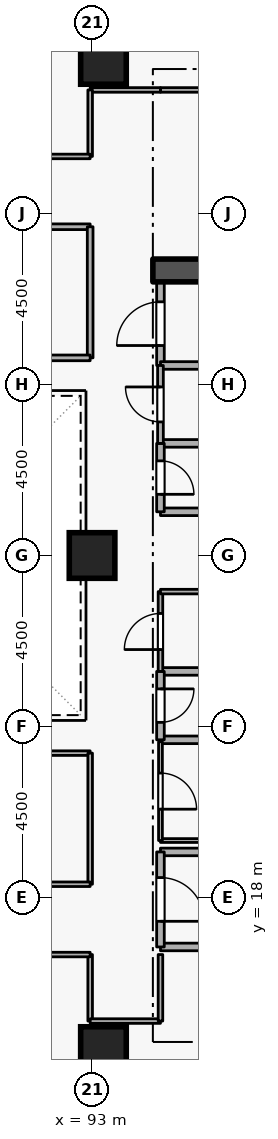
"""IFC4 building model, lengths in metres.
Left out: names, types, materials, properties, quantities, classifications, styles, units other than length and angle.
Written with IfcOpenShell. Run it as: python <this file> out.ifc"""

import sys

from ifc_helpers import new_model, si_unit, direction, frame, frame_2d, origin, origin_2d, place, context, subcontext, project, spatial, rectangle, extrude, element, fill, save


model = new_model("IFC4")
c1 = context("Model", 3, precision=1e-05, world=origin(), true_north=direction((0.0, 1.0)))
c2 = subcontext(c1, "Body", "Model", "MODEL_VIEW")
j1 = project(units=[si_unit("LENGTHUNIT", "METRE"), si_unit("PLANEANGLEUNIT", "RADIAN")], contexts=[c1])
p1 = place(None, origin())
s1 = spatial("IfcSite", under=j1, at=p1, CompositionType="ELEMENT")
p2 = place(p1, origin())
s2 = spatial("IfcBuilding", under=s1, at=p2, CompositionType="ELEMENT")
p3 = place(p2, frame((0.0, 0.0, 116.1)))
s3 = spatial("IfcBuildingStorey", under=s2, at=p3, CompositionType="ELEMENT", Elevation=116.1)
p4 = place(p3, frame((94.6, 34.5, 0.0), z_axis=(0.0, 0.0, 1.0), x_axis=(1.0, 0.0, 0.0)))
e1 = element("IfcWall", 1, at=p4, inside=s3, PredefinedType="SHEAR", context=c2, shape_type="SweptSolid", body=[
    extrude(rectangle(XDim=5.7, YDim=0.6, at=frame_2d((2.85, 0.0))), origin(), (0.0, 0.0, 1.0), 3.6),
])
for number, where, z_axis, x_axis in (
    (2, (93.3, 14.0, 0.0), (0.0, 0.0, 1.0), (1.0, 0.0, 0.0)),
    (3, (93.3, 40.0, 0.0), (0.0, 0.0, 1.0), (1.0, 0.0, 0.0)),
    (4, (93.0, 27.0, 0.0), (0.0, 0.0, 1.0), (1.0, 0.0, 0.0)),
):
    element("IfcColumn", number, at=place(p3, frame(where, z_axis=z_axis, x_axis=x_axis)), inside=s3, PredefinedType="COLUMN", context=c2, shape_type="SweptSolid", body=[
        extrude(rectangle(XDim=1.2, YDim=1.2, at=origin_2d()), origin(), (0.0, 0.0, 1.0), 3.6),
    ])
p5 = place(p3, frame((94.8, 16.7, 0.0), z_axis=(0.0, 0.0, 1.0), x_axis=(1.0, 0.0, 0.0)))
e5 = element("IfcWall", 5, at=p5, inside=s3, PredefinedType="STANDARD", context=c2, shape_type="SweptSolid", body=[
    extrude(rectangle(XDim=5.7, YDim=0.2, at=frame_2d((2.85, 0.0))), origin(), (0.0, 0.0, 1.0), 3.32),
])
p6 = place(p3, frame((97.1, 19.2, 0.0), z_axis=(0.0, 0.0, 1.0), x_axis=(-1.0, 0.0, 0.0)))
e6 = element("IfcWall", 6, at=p6, inside=s3, PredefinedType="STANDARD", context=c2, shape_type="SweptSolid", body=[
    extrude(rectangle(XDim=2.3, YDim=0.2, at=frame_2d((1.15, 0.0))), origin(), (0.0, 0.0, 1.0), 2.525),
])
p7 = place(p3, frame((94.8, 19.2, 0.0), z_axis=(0.0, 0.0, 1.0), x_axis=(0.0, -1.0, 0.0)))
e7 = element("IfcWall", 7, at=p7, inside=s3, PredefinedType="STANDARD", context=c2, shape_type="SweptSolid", body=[
    extrude(rectangle(XDim=2.5, YDim=0.2, at=frame_2d((1.25, 0.0))), origin(), (0.0, 0.0, 1.0), 3.32),
])
p8 = place(p7, frame((0.675, 0.0, 0.0)))
e8 = element("IfcOpeningElement", 8, at=p8, cuts=e7, PredefinedType="OPENING", context=c2, shape_type="SweptSolid", body=[
    extrude(rectangle(XDim=1.15, YDim=2.1, at=frame_2d((0.575, 1.05))), frame((0.0, 0.11, 0.0), z_axis=(0.0, -1.0, 0.0), x_axis=(1.0, 0.0, 0.0)), (0.0, 0.0, 1.0), 0.22),
])
for number, where, z_axis, x_axis in (
    (9, (94.8, 28.15, 0.0), (0.0, 0.0, 1.0), (1.0, 0.0, 0.0)),
    (10, (96.85, 29.95, 0.0), (0.0, 0.0, 1.0), (-1.0, 0.0, 0.0)),
):
    element("IfcWall", number, at=place(p3, frame(where, z_axis=z_axis, x_axis=x_axis)), inside=s3, PredefinedType="STANDARD", context=c2, shape_type="SweptSolid", body=[
        extrude(rectangle(XDim=2.05, YDim=0.2, at=frame_2d((1.025, 0.0))), origin(), (0.0, 0.0, 1.0), 3.32),
    ])
p9 = place(p3, frame((94.8, 29.95, 0.0), z_axis=(0.0, 0.0, 1.0), x_axis=(0.0, -1.0, 0.0)))
e11 = element("IfcWall", 11, at=p9, inside=s3, PredefinedType="STANDARD", context=c2, shape_type="SweptSolid", body=[
    extrude(rectangle(XDim=1.8, YDim=0.2, at=frame_2d((0.9, 0.0))), origin(), (0.0, 0.0, 1.0), 3.32),
])
p10 = place(p9, frame((0.46, 0.0, 0.0)))
e12 = element("IfcOpeningElement", 12, at=p10, cuts=e11, PredefinedType="OPENING", context=c2, shape_type="SweptSolid", body=[
    extrude(rectangle(XDim=0.88, YDim=2.04, at=frame_2d((0.44, 1.02))), frame((0.0, 0.11, 0.0), z_axis=(0.0, -1.0, 0.0), x_axis=(1.0, 0.0, 0.0)), (0.0, 0.0, 1.0), 0.22),
])
for number, where, z_axis, x_axis in (
    (13, (94.8, 22.15, 0.0), (0.0, 0.0, 1.0), (1.0, 0.0, 0.0)),
    (14, (96.85, 23.95, 0.0), (0.0, 0.0, 1.0), (-1.0, 0.0, 0.0)),
):
    element("IfcWall", number, at=place(p3, frame(where, z_axis=z_axis, x_axis=x_axis)), inside=s3, PredefinedType="STANDARD", context=c2, shape_type="SweptSolid", body=[
        extrude(rectangle(XDim=2.05, YDim=0.2, at=frame_2d((1.025, 0.0))), origin(), (0.0, 0.0, 1.0), 3.32),
    ])
p11 = place(p3, frame((94.8, 23.95, 0.0), z_axis=(0.0, 0.0, 1.0), x_axis=(0.0, -1.0, 0.0)))
e15 = element("IfcWall", 15, at=p11, inside=s3, PredefinedType="STANDARD", context=c2, shape_type="SweptSolid", body=[
    extrude(rectangle(XDim=1.8, YDim=0.2, at=frame_2d((0.9, 0.0))), origin(), (0.0, 0.0, 1.0), 3.32),
])
p12 = place(p11, frame((0.46, 0.0, 0.0)))
e16 = element("IfcOpeningElement", 16, at=p12, cuts=e15, PredefinedType="OPENING", context=c2, shape_type="SweptSolid", body=[
    extrude(rectangle(XDim=0.88, YDim=2.04, at=frame_2d((0.44, 1.02))), frame((0.0, 0.11, 0.0), z_axis=(0.0, -1.0, 0.0), x_axis=(1.0, 0.0, 0.0)), (0.0, 0.0, 1.0), 0.22),
])
p13 = place(p3, frame((94.8, 32.0, 0.0), z_axis=(0.0, 0.0, 1.0), x_axis=(0.0, 1.0, 0.0)))
e17 = element("IfcWall", 17, at=p13, inside=s3, PredefinedType="STANDARD", context=c2, shape_type="SweptSolid", body=[
    extrude(rectangle(XDim=2.2, YDim=0.2, at=frame_2d((1.1, 0.0))), origin(), (0.0, 0.0, 1.0), 3.32),
])
p14 = place(p13, frame((0.525, 0.0, 0.0)))
e18 = element("IfcOpeningElement", 18, at=p14, cuts=e17, PredefinedType="OPENING", context=c2, shape_type="SweptSolid", body=[
    extrude(rectangle(XDim=1.15, YDim=2.1, at=frame_2d((0.575, 1.05))), frame((0.0, 0.11, 0.0), z_axis=(0.0, -1.0, 0.0), x_axis=(1.0, 0.0, 0.0)), (0.0, 0.0, 1.0), 0.22),
])
p15 = place(p3, frame((96.85, 32.0, 0.0), z_axis=(0.0, 0.0, 1.0), x_axis=(-1.0, 0.0, 0.0)))
e19 = element("IfcWall", 19, at=p15, inside=s3, PredefinedType="STANDARD", context=c2, shape_type="SweptSolid", body=[
    extrude(rectangle(XDim=2.05, YDim=0.2, at=frame_2d((1.025, 0.0))), origin(), (0.0, 0.0, 1.0), 3.32),
])
p16 = place(p3, frame((94.8, 19.5, 0.0), z_axis=(0.0, 0.0, 1.0), x_axis=(1.0, 0.0, 0.0)))
e20 = element("IfcWall", 20, at=p16, inside=s3, PredefinedType="PARTITIONING", context=c2, shape_type="SweptSolid", body=[
    extrude(rectangle(XDim=2.05, YDim=0.1, at=frame_2d((1.025, 0.0))), origin(), (0.0, 0.0, 1.0), 2.525),
])
p17 = place(p3, frame((94.8, 22.1, 0.0), z_axis=(0.0, 0.0, 1.0), x_axis=(0.0, -1.0, 0.0)))
e21 = element("IfcWall", 21, at=p17, inside=s3, PredefinedType="PARTITIONING", context=c2, shape_type="SweptSolid", body=[
    extrude(rectangle(XDim=2.6, YDim=0.1, at=frame_2d((1.3, 0.0))), origin(), (0.0, 0.0, 1.0), 3.32),
])
p18 = place(p17, frame((0.825, 0.0, 0.0)))
e22 = element("IfcOpeningElement", 22, at=p18, cuts=e21, PredefinedType="OPENING", context=c2, shape_type="SweptSolid", body=[
    extrude(rectangle(XDim=0.95, YDim=2.1, at=frame_2d((0.475, 1.05))), frame((0.0, 0.06, 0.0), z_axis=(0.0, -1.0, 0.0), x_axis=(1.0, 0.0, 0.0)), (0.0, 0.0, 1.0), 0.12),
])
p19 = place(p3, frame((94.8, 23.95, 0.0), z_axis=(0.0, 0.0, 1.0), x_axis=(0.0, 1.0, 0.0)))
e23 = element("IfcWall", 23, at=p19, inside=s3, PredefinedType="PARTITIONING", context=c2, shape_type="SweptSolid", body=[
    extrude(rectangle(XDim=2.1, YDim=0.12, at=frame_2d((1.05, 0.0))), origin(), (0.0, 0.0, 1.0), 3.32),
])
p20 = place(p19, frame((0.575, 0.0, 0.0)))
e24 = element("IfcOpeningElement", 24, at=p20, cuts=e23, PredefinedType="OPENING", context=c2, shape_type="SweptSolid", body=[
    extrude(rectangle(XDim=0.95, YDim=2.1, at=frame_2d((0.475, 1.05))), frame((0.0, 0.07, 0.0), z_axis=(0.0, -1.0, 0.0), x_axis=(1.0, 0.0, 0.0)), (0.0, 0.0, 1.0), 0.14),
])
p21 = place(p3, frame((94.8, 26.05, 0.0), z_axis=(0.0, 0.0, 1.0), x_axis=(1.0, 0.0, 0.0)))
e25 = element("IfcWall", 25, at=p21, inside=s3, PredefinedType="PARTITIONING", context=c2, shape_type="SweptSolid", body=[
    extrude(rectangle(XDim=2.05, YDim=0.12, at=frame_2d((1.025, 0.0))), origin(), (0.0, 0.0, 1.0), 3.32),
])
p22 = place(p3, frame((94.8, 29.95, 0.0), z_axis=(0.0, 0.0, 1.0), x_axis=(0.0, 1.0, 0.0)))
e26 = element("IfcWall", 26, at=p22, inside=s3, PredefinedType="PARTITIONING", context=c2, shape_type="SweptSolid", body=[
    extrude(rectangle(XDim=2.05, YDim=0.15, at=frame_2d((1.025, 0.0))), origin(), (0.0, 0.0, 1.0), 3.32),
])
p23 = place(p22, frame((0.565, 0.0, 0.0)))
e27 = element("IfcOpeningElement", 27, at=p23, cuts=e26, PredefinedType="OPENING", context=c2, shape_type="SweptSolid", body=[
    extrude(rectangle(XDim=0.92, YDim=2.08, at=frame_2d((0.46, 1.04))), frame((0.0, 0.085, 0.0), z_axis=(0.0, -1.0, 0.0), x_axis=(1.0, 0.0, 0.0)), (0.0, 0.0, 1.0), 0.17),
])
p24 = place(p3, frame((92.95, 16.5, 0.0), z_axis=(0.0, 0.0, 1.0), x_axis=(0.0, -1.0, 0.0)))
e28 = element("IfcWall", 28, at=p24, inside=s3, PredefinedType="PARTITIONING", context=c2, shape_type="SweptSolid", body=[
    extrude(rectangle(XDim=1.75, YDim=0.12, at=frame_2d((0.875, 0.0))), origin(), (0.0, 0.0, 1.0), 3.32),
])
p25 = place(p3, frame((92.95, 14.75, 0.0), z_axis=(0.0, 0.0, 1.0), x_axis=(1.0, 0.0, 0.0)))
e29 = element("IfcWall", 29, at=p25, inside=s3, PredefinedType="PARTITIONING", context=c2, shape_type="SweptSolid", body=[
    extrude(rectangle(XDim=1.85, YDim=0.12, at=frame_2d((0.925, 0.0))), origin(), (0.0, 0.0, 1.0), 3.32),
])
p26 = place(p3, frame((94.8, 14.75, 0.0), z_axis=(0.0, 0.0, 1.0), x_axis=(0.0, 1.0, 0.0)))
e30 = element("IfcWall", 30, at=p26, inside=s3, PredefinedType="PARTITIONING", context=c2, shape_type="SweptSolid", body=[
    extrude(rectangle(XDim=1.75, YDim=0.12, at=frame_2d((0.875, 0.0))), origin(), (0.0, 0.0, 1.0), 3.32),
])
p27 = place(p3, frame((88.5, 16.5, 0.0), z_axis=(0.0, 0.0, 1.0), x_axis=(1.0, 0.0, 0.0)))
e31 = element("IfcWall", 31, at=p27, inside=s3, PredefinedType="PARTITIONING", context=c2, shape_type="SweptSolid", body=[
    extrude(rectangle(XDim=4.45, YDim=0.12, at=frame_2d((2.225, 0.0))), origin(), (0.0, 0.0, 1.0), 3.32),
])
p28 = place(p27, frame((1.7, 0.0, 0.0)))
e32 = element("IfcOpeningElement", 32, at=p28, cuts=e31, PredefinedType="OPENING", context=c2, shape_type="SweptSolid", body=[
    extrude(rectangle(XDim=1.05, YDim=2.1, at=frame_2d((0.525, 1.05))), frame((0.0, 0.07, 0.0), z_axis=(0.0, -1.0, 0.0), x_axis=(1.0, 0.0, 0.0)), (0.0, 0.0, 1.0), 0.14),
])
p29 = place(p3, frame((97.95, 39.25, 0.0), z_axis=(0.0, 0.0, 1.0), x_axis=(-1.0, 0.0, 0.0)))
e33 = element("IfcWall", 33, at=p29, inside=s3, PredefinedType="PARTITIONING", context=c2, shape_type="SweptSolid", body=[
    extrude(rectangle(XDim=3.15, YDim=0.12, at=frame_2d((1.575, 0.0))), origin(), (0.0, 0.0, 1.0), 3.32),
])
p30 = place(p3, frame((94.8, 39.25, 0.0), z_axis=(0.0, 0.0, 1.0), x_axis=(-1.0, 0.0, 0.0)))
e34 = element("IfcWall", 34, at=p30, inside=s3, PredefinedType="PARTITIONING", context=c2, shape_type="SweptSolid", body=[
    extrude(rectangle(XDim=1.85, YDim=0.12, at=frame_2d((0.925, 0.0))), origin(), (0.0, 0.0, 1.0), 3.32),
])
p31 = place(p3, frame((92.95, 39.25, 0.0), z_axis=(0.0, 0.0, 1.0), x_axis=(0.0, -1.0, 0.0)))
e35 = element("IfcWall", 35, at=p31, inside=s3, PredefinedType="PARTITIONING", context=c2, shape_type="SweptSolid", body=[
    extrude(rectangle(XDim=1.75, YDim=0.12, at=frame_2d((0.875, 0.0))), origin(), (0.0, 0.0, 1.0), 3.32),
])
p32 = place(p3, frame((92.95, 37.5, 0.0), z_axis=(0.0, 0.0, 1.0), x_axis=(-1.0, 0.0, 0.0)))
e36 = element("IfcWall", 36, at=p32, inside=s3, PredefinedType="PARTITIONING", context=c2, shape_type="SweptSolid", body=[
    extrude(rectangle(XDim=4.45, YDim=0.12, at=frame_2d((2.225, 0.0))), origin(), (0.0, 0.0, 1.0), 3.32),
])
p33 = place(p32, frame((1.7, 0.0, 0.0)))
e37 = element("IfcOpeningElement", 37, at=p33, cuts=e36, PredefinedType="OPENING", context=c2, shape_type="SweptSolid", body=[
    extrude(rectangle(XDim=1.05, YDim=2.1, at=frame_2d((0.525, 1.05))), frame((0.0, 0.07, 0.0), z_axis=(0.0, -1.0, 0.0), x_axis=(1.0, 0.0, 0.0)), (0.0, 0.0, 1.0), 0.14),
])
p34 = place(p3, frame((84.05, 35.65, 0.0), z_axis=(0.0, 0.0, 1.0), x_axis=(1.0, 0.0, 0.0)))
e38 = element("IfcWall", 38, at=p34, inside=s3, PredefinedType="PARTITIONING", context=c2, shape_type="SweptSolid", body=[
    extrude(rectangle(XDim=8.9, YDim=0.15, at=frame_2d((4.45, 0.0))), origin(), (0.0, 0.0, 1.0), 3.32),
])
p35 = place(p34, frame((3.8, 0.0, 0.0)))
e39 = element("IfcOpeningElement", 39, at=p35, cuts=e38, PredefinedType="OPENING", context=c2, shape_type="SweptSolid", body=[
    extrude(rectangle(XDim=1.3, YDim=2.12, at=frame_2d((0.65, 1.06))), frame((0.0, 0.085, 0.0), z_axis=(0.0, -1.0, 0.0), x_axis=(1.0, 0.0, 0.0)), (0.0, 0.0, 1.0), 0.17),
])
p36 = place(p3, frame((92.95, 35.65, 0.0), z_axis=(0.0, 0.0, 1.0), x_axis=(0.0, -1.0, 0.0)))
e40 = element("IfcWall", 40, at=p36, inside=s3, PredefinedType="PARTITIONING", context=c2, shape_type="SweptSolid", body=[
    extrude(rectangle(XDim=3.45, YDim=0.15, at=frame_2d((1.725, 0.0))), origin(), (0.0, 0.0, 1.0), 3.32),
])
p37 = place(p3, frame((92.95, 32.2, 0.0), z_axis=(0.0, 0.0, 1.0), x_axis=(-1.0, 0.0, 0.0)))
e41 = element("IfcWall", 41, at=p37, inside=s3, PredefinedType="PARTITIONING", context=c2, shape_type="SweptSolid", body=[
    extrude(rectangle(XDim=8.9, YDim=0.15, at=frame_2d((4.45, 0.0))), origin(), (0.0, 0.0, 1.0), 3.32),
])
p38 = place(p3, frame((84.05, 21.8, 0.0), z_axis=(0.0, 0.0, 1.0), x_axis=(1.0, 0.0, 0.0)))
e42 = element("IfcWall", 42, at=p38, inside=s3, PredefinedType="PARTITIONING", context=c2, shape_type="SweptSolid", body=[
    extrude(rectangle(XDim=8.9, YDim=0.12, at=frame_2d((4.45, 0.0))), origin(), (0.0, 0.0, 1.0), 3.32),
])
p39 = place(p3, frame((92.95, 21.8, 0.0), z_axis=(0.0, 0.0, 1.0), x_axis=(0.0, -1.0, 0.0)))
e43 = element("IfcWall", 43, at=p39, inside=s3, PredefinedType="PARTITIONING", context=c2, shape_type="SweptSolid", body=[
    extrude(rectangle(XDim=3.45, YDim=0.12, at=frame_2d((1.725, 0.0))), origin(), (0.0, 0.0, 1.0), 3.32),
])
p40 = place(p3, frame((92.95, 18.35, 0.0), z_axis=(0.0, 0.0, 1.0), x_axis=(-1.0, 0.0, 0.0)))
e44 = element("IfcWall", 44, at=p40, inside=s3, PredefinedType="PARTITIONING", context=c2, shape_type="SweptSolid", body=[
    extrude(rectangle(XDim=8.9, YDim=0.12, at=frame_2d((4.45, 0.0))), origin(), (0.0, 0.0, 1.0), 3.32),
])
p41 = place(p40, frame((2.875, 0.0, 0.0)))
e45 = element("IfcOpeningElement", 45, at=p41, cuts=e44, PredefinedType="OPENING", context=c2, shape_type="SweptSolid", body=[
    extrude(rectangle(XDim=0.95, YDim=2.1, at=frame_2d((0.475, 1.05))), frame((0.0, 0.07, 0.0), z_axis=(0.0, -1.0, 0.0), x_axis=(1.0, 0.0, 0.0)), (0.0, 0.0, 1.0), 0.14),
])
p42 = place(p8, origin())
e46 = element("IfcDoor", 46, at=p42, inside=s3, OperationType="SINGLE_SWING_RIGHT", PredefinedType="DOOR", context=c2, shape_type="SweptSolid", body=[
    extrude(rectangle(XDim=1.15, YDim=2.1, at=frame_2d((0.575, 1.05))), frame((0.0, 0.025, 0.0), z_axis=(0.0, -1.0, 0.0), x_axis=(1.0, 0.0, 0.0)), (0.0, 0.0, 1.0), 0.05),
])
fill(e8, e46)
p43 = place(p10, origin())
e47 = element("IfcDoor", 47, at=p43, inside=s3, OperationType="SINGLE_SWING_RIGHT", PredefinedType="DOOR", context=c2, shape_type="SweptSolid", body=[
    extrude(rectangle(XDim=0.88, YDim=2.04, at=frame_2d((0.44, 1.02))), frame((0.0, 0.025, 0.0), z_axis=(0.0, -1.0, 0.0), x_axis=(1.0, 0.0, 0.0)), (0.0, 0.0, 1.0), 0.05),
])
fill(e12, e47)
p44 = place(p12, origin())
e48 = element("IfcDoor", 48, at=p44, inside=s3, OperationType="SINGLE_SWING_LEFT", PredefinedType="DOOR", context=c2, shape_type="SweptSolid", body=[
    extrude(rectangle(XDim=0.88, YDim=2.04, at=frame_2d((0.44, 1.02))), frame((0.0, 0.025, 0.0), z_axis=(0.0, -1.0, 0.0), x_axis=(1.0, 0.0, 0.0)), (0.0, 0.0, 1.0), 0.05),
])
fill(e16, e48)
p45 = place(p18, origin())
e49 = element("IfcDoor", 49, at=p45, inside=s3, OperationType="SINGLE_SWING_RIGHT", PredefinedType="DOOR", context=c2, shape_type="SweptSolid", body=[
    extrude(rectangle(XDim=0.95, YDim=2.1, at=frame_2d((0.475, 1.05))), frame((0.0, 0.025, 0.0), z_axis=(0.0, -1.0, 0.0), x_axis=(1.0, 0.0, 0.0)), (0.0, 0.0, 1.0), 0.05),
])
fill(e22, e49)
p46 = place(p20, origin())
e50 = element("IfcDoor", 50, at=p46, inside=s3, OperationType="SINGLE_SWING_LEFT", PredefinedType="DOOR", context=c2, shape_type="SweptSolid", body=[
    extrude(rectangle(XDim=0.95, YDim=2.1, at=frame_2d((0.475, 1.05))), frame((0.0, 0.025, 0.0), z_axis=(0.0, -1.0, 0.0), x_axis=(1.0, 0.0, 0.0)), (0.0, 0.0, 1.0), 0.05),
])
fill(e24, e50)
p47 = place(p23, origin())
e51 = element("IfcDoor", 51, at=p47, inside=s3, OperationType="SINGLE_SWING_RIGHT", PredefinedType="DOOR", context=c2, shape_type="SweptSolid", body=[
    extrude(rectangle(XDim=0.92, YDim=2.08, at=frame_2d((0.46, 1.04))), frame((0.0, 0.025, 0.0), z_axis=(0.0, -1.0, 0.0), x_axis=(1.0, 0.0, 0.0)), (0.0, 0.0, 1.0), 0.05),
])
fill(e27, e51)
p48 = place(p14, origin())
e52 = element("IfcDoor", 52, at=p48, inside=s3, OperationType="SINGLE_SWING_LEFT", PredefinedType="DOOR", context=c2, shape_type="SweptSolid", body=[
    extrude(rectangle(XDim=1.15, YDim=2.1, at=frame_2d((0.575, 1.05))), frame((0.0, 0.025, 0.0), z_axis=(0.0, -1.0, 0.0), x_axis=(1.0, 0.0, 0.0)), (0.0, 0.0, 1.0), 0.05),
])
fill(e18, e52)
save(model, sys.argv[1])
